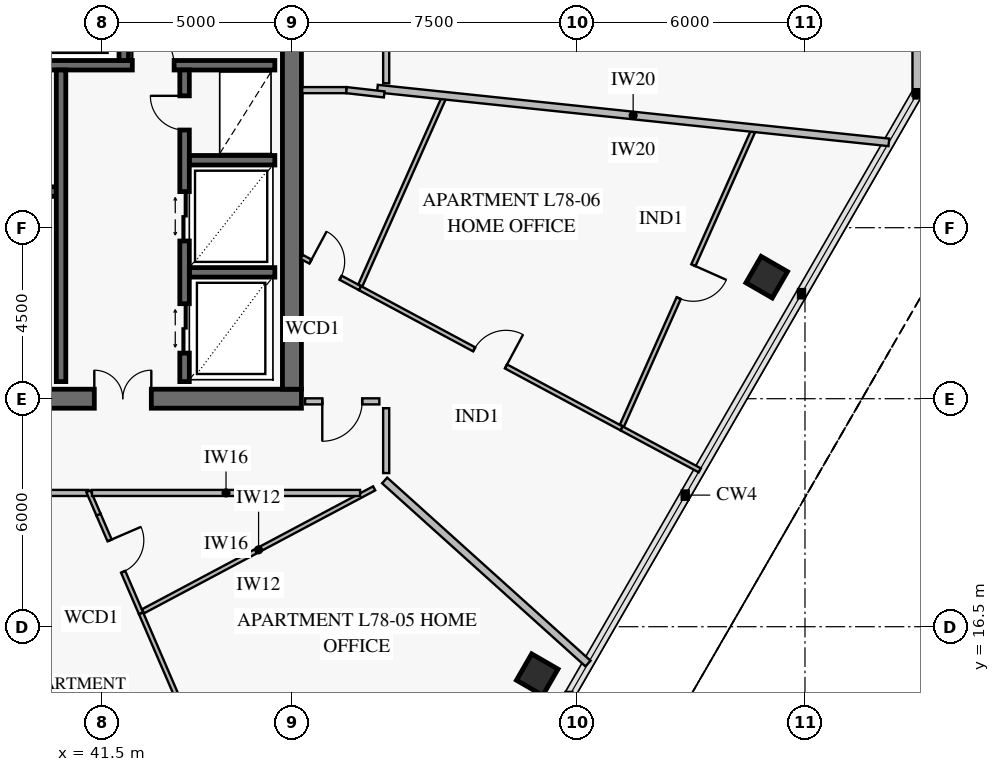
"""IFC4 building model, lengths in metres.
Left out: names, types, materials, properties, quantities, classifications, styles, units other than length and angle.
Written with IfcOpenShell. Run it as: python <this file> out.ifc"""

import sys

from ifc_helpers import new_model, si_unit, direction, frame, frame_2d, origin, origin_2d, place, context, subcontext, project, spatial, rectangle, extrude, element, fill, save


model = new_model("IFC4")
c1 = context("Model", 3, precision=1e-05, world=origin(), true_north=direction((0.0, 1.0)))
c2 = subcontext(c1, "Body", "Model", "MODEL_VIEW")
j1 = project(units=[si_unit("LENGTHUNIT", "METRE"), si_unit("PLANEANGLEUNIT", "RADIAN")], contexts=[c1])
p1 = place(None, origin())
s1 = spatial("IfcSite", under=j1, at=p1, CompositionType="ELEMENT")
p2 = place(p1, origin())
s2 = spatial("IfcBuilding", under=s1, at=p2, CompositionType="ELEMENT")
p3 = place(p2, frame((0.0, 0.0, 308.2)))
s3 = spatial("IfcBuildingStorey", under=s2, at=p3, CompositionType="ELEMENT", Elevation=308.2)
p4 = place(p3, frame((37.35, 22.5, 0.0), z_axis=(0.0, 0.0, 1.0), x_axis=(1.0, 0.0, 0.0)))
e1 = element("IfcWall", 1, at=p4, inside=s3, PredefinedType="SHEAR", context=c2, shape_type="SweptSolid", body=[
    extrude(rectangle(XDim=9.4, YDim=0.5, at=frame_2d((4.7, 0.0))), origin(), (0.0, 0.0, 1.0), 3.8),
])
p5 = place(p4, frame((3.95, 0.0, 0.0)))
e2 = element("IfcOpeningElement", 2, at=p5, cuts=e1, PredefinedType="OPENING", context=c2, shape_type="SweptSolid", body=[
    extrude(rectangle(XDim=1.5, YDim=2.15, at=frame_2d((0.75, 1.075))), frame((0.0, 0.262, 0.0), z_axis=(0.0, -1.0, 0.0), x_axis=(1.0, 0.0, 0.0)), (0.0, 0.0, 1.0), 0.524),
])
p6 = place(p3, frame((46.5, 22.75, 0.0), z_axis=(0.0, 0.0, 1.0), x_axis=(0.0, 1.0, 0.0)))
e3 = element("IfcWall", 3, at=p6, inside=s3, PredefinedType="SHEAR", context=c2, shape_type="SweptSolid", body=[
    extrude(rectangle(XDim=18.5, YDim=0.5, at=frame_2d((9.25, 0.0))), origin(), (0.0, 0.0, 1.0), 3.8),
])
p7 = place(p6, frame((9.0, 0.0, 0.0)))
e4 = element("IfcOpeningElement", 4, at=p7, cuts=e3, PredefinedType="OPENING", context=c2, shape_type="SweptSolid", body=[
    extrude(rectangle(XDim=1.1, YDim=2.15, at=frame_2d((0.55, 1.075))), frame((0.0, 0.262, 0.0), z_axis=(0.0, -1.0, 0.0), x_axis=(1.0, 0.0, 0.0)), (0.0, 0.0, 1.0), 0.524),
])
for number, where, z_axis, x_axis in (
    (5, (52.955, 15.238, 0.0), (0.0, 0.0, 1.0), (0.5, 0.866, 0.0)),
    (6, (58.993, 25.698, 0.0), (0.0, 0.0, 1.0), (0.5, 0.866, 0.0)),
):
    element("IfcColumn", number, at=place(p3, frame(where, z_axis=z_axis, x_axis=x_axis)), inside=s3, PredefinedType="COLUMN", context=c2, shape_type="SweptSolid", body=[
        extrude(rectangle(XDim=0.8, YDim=0.8, at=origin_2d()), origin(), (0.0, 0.0, 1.0), 3.55),
    ])
p8 = place(p3, frame((62.969, 33.532, 0.0), z_axis=(0.0, 0.0, 1.0), x_axis=(0.0, -1.0, 0.0)))
e7 = element("IfcWall", 7, at=p8, inside=s3, PredefinedType="SOLIDWALL", context=c2, shape_type="SweptSolid", body=[
    extrude(rectangle(XDim=3.065, YDim=0.28, at=frame_2d((1.532, 0.0))), origin(), (0.0, 0.0, 1.0), 3.55),
])
p9 = place(p3, frame((25.95, 31.275, 0.0), z_axis=(0.0, 0.0, 1.0), x_axis=(1.0, 0.0, 0.0)))
e8 = element("IfcWall", 8, at=p9, inside=s3, PredefinedType="SOLIDWALL", context=c2, shape_type="SweptSolid", body=[
    extrude(rectangle(XDim=20.1, YDim=0.25, at=frame_2d((10.05, 0.0))), origin(), (0.0, 0.0, 1.0), 3.8),
])
p10 = place(p9, frame((2.6, 0.0, 0.0)))
e9 = element("IfcOpeningElement", 9, at=p10, cuts=e8, PredefinedType="OPENING", context=c2, shape_type="SweptSolid", body=[
    extrude(rectangle(XDim=1.1, YDim=2.15, at=frame_2d((0.55, 1.075))), frame((0.0, 0.137, 0.0), z_axis=(0.0, -1.0, 0.0), x_axis=(1.0, 0.0, 0.0)), (0.0, 0.0, 1.0), 0.274),
])
p11 = place(p9, frame((10.6, 0.0, 0.0)))
e10 = element("IfcOpeningElement", 10, at=p11, cuts=e8, PredefinedType="OPENING", context=c2, shape_type="SweptSolid", body=[
    extrude(rectangle(XDim=1.1, YDim=2.15, at=frame_2d((0.55, 1.075))), frame((0.0, 0.137, 0.0), z_axis=(0.0, -1.0, 0.0), x_axis=(1.0, 0.0, 0.0)), (0.0, 0.0, 1.0), 0.274),
])
p12 = place(p9, frame((16.35, 0.0, 0.0)))
e11 = element("IfcOpeningElement", 11, at=p12, cuts=e8, PredefinedType="OPENING", context=c2, shape_type="SweptSolid", body=[
    extrude(rectangle(XDim=1.1, YDim=2.15, at=frame_2d((0.55, 1.075))), frame((0.0, 0.137, 0.0), z_axis=(0.0, -1.0, 0.0), x_axis=(1.0, 0.0, 0.0)), (0.0, 0.0, 1.0), 0.274),
])
p13 = place(p3, frame((42.075, 31.4, 0.0), z_axis=(0.0, 0.0, 1.0), x_axis=(0.0, 1.0, 0.0)))
e12 = element("IfcWall", 12, at=p13, inside=s3, PredefinedType="SOLIDWALL", context=c2, shape_type="SweptSolid", body=[
    extrude(rectangle(XDim=9.7, YDim=0.25, at=frame_2d((4.85, 0.0))), origin(), (0.0, 0.0, 1.0), 3.8),
])
p14 = place(p3, frame((38.0, 27.95, 0.0), z_axis=(0.0, 0.0, 1.0), x_axis=(1.0, 0.0, 0.0)))
e13 = element("IfcWall", 13, at=p14, inside=s3, PredefinedType="SOLIDWALL", context=c2, shape_type="SweptSolid", body=[
    extrude(rectangle(XDim=2.3, YDim=0.25, at=frame_2d((1.15, 0.0))), origin(), (0.0, 0.0, 1.0), 3.8),
])
p15 = place(p3, frame((40.425, 22.95, 0.0), z_axis=(0.0, 0.0, 1.0), x_axis=(0.0, 1.0, 0.0)))
e14 = element("IfcWall", 14, at=p15, inside=s3, PredefinedType="SOLIDWALL", context=c2, shape_type="SweptSolid", body=[
    extrude(rectangle(XDim=8.2, YDim=0.25, at=frame_2d((4.1, 0.0))), origin(), (0.0, 0.0, 1.0), 3.8),
])
for number, where, z_axis, x_axis in (
    (15, (43.8, 25.825, 0.0), (0.0, 0.0, 1.0), (1.0, 0.0, 0.0)),
    (16, (43.8, 28.775, 0.0), (0.0, 0.0, 1.0), (1.0, 0.0, 0.0)),
):
    element("IfcWall", number, at=place(p3, frame(where, z_axis=z_axis, x_axis=x_axis)), inside=s3, PredefinedType="SOLIDWALL", context=c2, shape_type="SweptSolid", body=[
        extrude(rectangle(XDim=2.25, YDim=0.25, at=frame_2d((1.125, 0.0))), origin(), (0.0, 0.0, 1.0), 3.8),
    ])
p16 = place(p3, frame((43.675, 22.95, 0.0), z_axis=(0.0, 0.0, 1.0), x_axis=(0.0, 1.0, 0.0)))
e17 = element("IfcWall", 17, at=p16, inside=s3, PredefinedType="SOLIDWALL", context=c2, shape_type="SweptSolid", body=[
    extrude(rectangle(XDim=8.2, YDim=0.25, at=frame_2d((4.1, 0.0))), origin(), (0.0, 0.0, 1.0), 3.8),
])
p17 = place(p16, frame((0.75, 0.0, 0.0)))
e18 = element("IfcOpeningElement", 18, at=p17, cuts=e17, PredefinedType="OPENING", context=c2, shape_type="SweptSolid", body=[
    extrude(rectangle(XDim=1.3, YDim=2.3, at=frame_2d((0.65, 1.15))), frame((0.0, 0.137, 0.0), z_axis=(0.0, -1.0, 0.0), x_axis=(1.0, 0.0, 0.0)), (0.0, 0.0, 1.0), 0.274),
])
p18 = place(p16, frame((3.7, 0.0, 0.0)))
e19 = element("IfcOpeningElement", 19, at=p18, cuts=e17, PredefinedType="OPENING", context=c2, shape_type="SweptSolid", body=[
    extrude(rectangle(XDim=1.3, YDim=2.3, at=frame_2d((0.65, 1.15))), frame((0.0, 0.137, 0.0), z_axis=(0.0, -1.0, 0.0), x_axis=(1.0, 0.0, 0.0)), (0.0, 0.0, 1.0), 0.274),
])
p19 = place(p16, frame((6.62, 0.0, 0.0)))
e20 = element("IfcOpeningElement", 20, at=p19, cuts=e17, PredefinedType="OPENING", context=c2, shape_type="SweptSolid", body=[
    extrude(rectangle(XDim=0.9, YDim=2.1, at=frame_2d((0.45, 1.05))), frame((0.0, 0.137, 0.0), z_axis=(0.0, -1.0, 0.0), x_axis=(1.0, 0.0, 0.0)), (0.0, 0.0, 1.0), 0.274),
])
p20 = place(p3, frame((41.41, 19.45, 0.0), z_axis=(0.0, 0.0, 1.0), x_axis=(0.395844398044, -0.918317598948, 0.0)))
e21 = element("IfcWall", 21, at=p20, inside=s3, PredefinedType="PARTITIONING", context=c2, shape_type="SweptSolid", body=[
    extrude(rectangle(XDim=2.83, YDim=0.12, at=frame_2d((1.415, 0.0))), origin(), (0.0, 0.0, 1.0), 3.55),
])
p21 = place(p20, frame((0.739, 0.0, 0.0)))
e22 = element("IfcOpeningElement", 22, at=p21, cuts=e21, PredefinedType="OPENING", context=c2, shape_type="SweptSolid", body=[
    extrude(rectangle(XDim=0.9, YDim=2.1, at=frame_2d((0.45, 1.05))), frame((0.0, 0.072, 0.0), z_axis=(0.0, -1.0, 0.0), x_axis=(1.0, 0.0, 0.0)), (0.0, 0.0, 1.0), 0.144),
])
p22 = place(p3, frame((42.531, 16.851, 0.0), z_axis=(0.0, 0.0, 1.0), x_axis=(0.39587300587, -0.918305266904, 0.0)))
e23 = element("IfcWall", 23, at=p22, inside=s3, PredefinedType="PARTITIONING", context=c2, shape_type="SweptSolid", body=[
    extrude(rectangle(XDim=7.643, YDim=0.12, at=frame_2d((3.821, 0.0))), origin(), (0.0, 0.0, 1.0), 2.97),
])
p23 = place(p22, frame((3.322, 0.0, 0.0)))
e24 = element("IfcOpeningElement", 24, at=p23, cuts=e23, PredefinedType="OPENING", context=c2, shape_type="SweptSolid", body=[
    extrude(rectangle(XDim=0.95, YDim=2.1, at=frame_2d((0.475, 1.05))), frame((0.0, 0.072, 0.0), z_axis=(0.0, -1.0, 0.0), x_axis=(1.0, 0.0, 0.0)), (0.0, 0.0, 1.0), 0.144),
])
p24 = place(p3, frame((37.811, 20.02, 0.0), z_axis=(0.0, 0.0, 1.0), x_axis=(1.0, 0.0, 0.0)))
e25 = element("IfcWall", 25, at=p24, inside=s3, PredefinedType="PARTITIONING", context=c2, shape_type="SweptSolid", body=[
    extrude(rectangle(XDim=3.332, YDim=0.16, at=frame_2d((1.666, 0.0))), origin(), (0.0, 0.0, 1.0), 3.0),
])
p25 = place(p24, frame((1.141, 0.0, 0.0)))
e26 = element("IfcOpeningElement", 26, at=p25, cuts=e25, PredefinedType="OPENING", context=c2, shape_type="SweptSolid", body=[
    extrude(rectangle(XDim=1.05, YDim=2.15, at=frame_2d((0.525, 1.075))), frame((0.0, 0.092, 0.0), z_axis=(0.0, -1.0, 0.0), x_axis=(1.0, 0.0, 0.0)), (0.0, 0.0, 1.0), 0.184),
])
p26 = place(p3, frame((46.758, 26.232, 0.0), z_axis=(0.0, 0.0, 1.0), x_axis=(0.881229995183, -0.472687735814, 0.0)))
e27 = element("IfcWall", 27, at=p26, inside=s3, PredefinedType="PARTITIONING", context=c2, shape_type="SweptSolid", body=[
    extrude(rectangle(XDim=1.743, YDim=0.12, at=frame_2d((0.872, 0.0))), origin(), (0.0, 0.0, 1.0), 3.55),
])
p27 = place(p26, frame((0.26, 0.0, 0.0)))
e28 = element("IfcOpeningElement", 28, at=p27, cuts=e27, PredefinedType="OPENING", context=c2, shape_type="SweptSolid", body=[
    extrude(rectangle(XDim=0.9, YDim=2.1, at=frame_2d((0.45, 1.05))), frame((0.0, 0.072, 0.0), z_axis=(0.0, -1.0, 0.0), x_axis=(1.0, 0.0, 0.0)), (0.0, 0.0, 1.0), 0.144),
])
p28 = place(p3, frame((48.294, 25.408, 0.0), z_axis=(0.0, 0.0, 1.0), x_axis=(0.881316812489, -0.472525846937, 0.0)))
e29 = element("IfcWall", 29, at=p28, inside=s3, PredefinedType="PARTITIONING", context=c2, shape_type="SweptSolid", body=[
    extrude(rectangle(XDim=7.811, YDim=0.12, at=frame_2d((3.905, 0.0))), origin(), (0.0, 0.0, 1.0), 3.2),
])
p29 = place(p28, frame((3.405, 0.0, 0.0)))
e30 = element("IfcOpeningElement", 30, at=p29, cuts=e29, PredefinedType="OPENING", context=c2, shape_type="SweptSolid", body=[
    extrude(rectangle(XDim=0.95, YDim=2.1, at=frame_2d((0.475, 1.05))), frame((0.0, 0.072, 0.0), z_axis=(0.0, -1.0, 0.0), x_axis=(1.0, 0.0, 0.0)), (0.0, 0.0, 1.0), 0.144),
])
p30 = place(p3, frame((55.183, 21.791, 0.0), z_axis=(0.0, 0.0, 1.0), x_axis=(0.406737913361, 0.913544892074, 0.0)))
e31 = element("IfcWall", 31, at=p30, inside=s3, PredefinedType="PARTITIONING", context=c2, shape_type="SweptSolid", body=[
    extrude(rectangle(XDim=8.463, YDim=0.12, at=frame_2d((4.232, 0.0))), origin(), (0.0, 0.0, 1.0), 3.0),
])
p31 = place(p30, frame((3.672, 0.0, 0.0)))
e32 = element("IfcOpeningElement", 32, at=p31, cuts=e31, PredefinedType="OPENING", context=c2, shape_type="SweptSolid", body=[
    extrude(rectangle(XDim=0.95, YDim=2.1, at=frame_2d((0.475, 1.05))), frame((0.0, 0.072, 0.0), z_axis=(0.0, -1.0, 0.0), x_axis=(1.0, 0.0, 0.0)), (0.0, 0.0, 1.0), 0.144),
])
p32 = place(p3, frame((48.8, 22.43, 0.0), z_axis=(0.0, 0.0, 1.0), x_axis=(-1.0, 0.0, 0.0)))
e33 = element("IfcWall", 33, at=p32, inside=s3, PredefinedType="PARTITIONING", context=c2, shape_type="SweptSolid", body=[
    extrude(rectangle(XDim=1.953, YDim=0.16, at=frame_2d((0.977, 0.0))), origin(), (0.0, 0.0, 1.0), 3.55),
])
p33 = place(p32, frame((0.451, 0.0, 0.0)))
e34 = element("IfcOpeningElement", 34, at=p33, cuts=e33, PredefinedType="OPENING", context=c2, shape_type="SweptSolid", body=[
    extrude(rectangle(XDim=1.05, YDim=2.15, at=frame_2d((0.525, 1.075))), frame((0.0, 0.092, 0.0), z_axis=(0.0, -1.0, 0.0), x_axis=(1.0, 0.0, 0.0)), (0.0, 0.0, 1.0), 0.184),
])
p34 = place(p3, frame((48.98, 30.8, 0.0), z_axis=(0.0, 0.0, 1.0), x_axis=(0.0, 1.0, 0.0)))
e35 = element("IfcWall", 35, at=p34, inside=s3, PredefinedType="PARTITIONING", context=c2, shape_type="SweptSolid", body=[
    extrude(rectangle(XDim=2.958, YDim=0.16, at=frame_2d((1.479, 0.0))), origin(), (0.0, 0.0, 1.0), 3.55),
])
p35 = place(p34, frame((0.954, 0.0, 0.0)))
e36 = element("IfcOpeningElement", 36, at=p35, cuts=e35, PredefinedType="OPENING", context=c2, shape_type="SweptSolid", body=[
    extrude(rectangle(XDim=1.05, YDim=2.15, at=frame_2d((0.525, 1.075))), frame((0.0, 0.092, 0.0), z_axis=(0.0, -1.0, 0.0), x_axis=(1.0, 0.0, 0.0)), (0.0, 0.0, 1.0), 0.184),
])
p36 = place(p3, frame((41.146, 20.063, 0.0), z_axis=(0.0, 0.0, 1.0), x_axis=(0.395728306554, -0.918367631938, 0.0)))
e37 = element("IfcWall", 37, at=p36, inside=s3, PredefinedType="PARTITIONING", context=c2, shape_type="SweptSolid", body=[
    extrude(rectangle(XDim=0.667, YDim=0.12, at=frame_2d((0.334, 0.0))), origin(), (0.0, 0.0, 1.0), 3.55),
])
p37 = place(p3, frame((42.581, 16.906, 0.0), z_axis=(0.0, 0.0, 1.0), x_axis=(0.882955532535, 0.469456630122, 0.0)))
e38 = element("IfcWall", 38, at=p37, inside=s3, PredefinedType="PARTITIONING", context=c2, shape_type="SweptSolid", body=[
    extrude(rectangle(XDim=6.889, YDim=0.12, at=frame_2d((3.445, 0.0))), origin(), (0.0, 0.0, 1.0), 3.0),
])
p38 = place(p3, frame((48.94, 20.349, 0.0), z_axis=(0.0, 0.0, 1.0), x_axis=(0.74315080538, -0.669123964944, 0.0)))
e39 = element("IfcWall", 39, at=p38, inside=s3, PredefinedType="PARTITIONING", context=c2, shape_type="SweptSolid", body=[
    extrude(rectangle(XDim=7.199, YDim=0.2, at=frame_2d((3.6, 0.0))), origin(), (0.0, 0.0, 1.0), 2.97),
])
p39 = place(p3, frame((55.178, 21.717, 0.0), z_axis=(0.0, 0.0, 1.0), x_axis=(0.881280537469, -0.472593497922, 0.0)))
e40 = element("IfcWall", 40, at=p39, inside=s3, PredefinedType="PARTITIONING", context=c2, shape_type="SweptSolid", body=[
    extrude(rectangle(XDim=2.33, YDim=0.12, at=frame_2d((1.165, 0.0))), origin(), (0.0, 0.0, 1.0), 2.97),
])
p40 = place(p3, frame((48.3, 25.482, 0.0), z_axis=(0.0, 0.0, 1.0), x_axis=(0.406734356289, 0.913546475782, 0.0)))
e41 = element("IfcWall", 41, at=p40, inside=s3, PredefinedType="PARTITIONING", context=c2, shape_type="SweptSolid", body=[
    extrude(rectangle(XDim=5.435, YDim=0.12, at=frame_2d((2.718, 0.0))), origin(), (0.0, 0.0, 1.0), 3.0),
])
p41 = place(p3, frame((48.749, 30.66, 0.0), z_axis=(0.0, 0.0, 1.0), x_axis=(0.994522047609, -0.104527014781, 0.0)))
e42 = element("IfcWall", 42, at=p41, inside=s3, PredefinedType="PARTITIONING", context=c2, shape_type="SweptSolid", body=[
    extrude(rectangle(XDim=13.533, YDim=0.2, at=frame_2d((6.767, 0.0))), origin(), (0.0, 0.0, 1.0), 2.97),
])
p42 = place(p3, frame((41.238, 20.02, 0.0), z_axis=(0.0, 0.0, 1.0), x_axis=(1.0, 0.0, 0.0)))
e43 = element("IfcWall", 43, at=p42, inside=s3, PredefinedType="PARTITIONING", context=c2, shape_type="SweptSolid", body=[
    extrude(rectangle(XDim=7.055, YDim=0.16, at=frame_2d((3.527, 0.0))), origin(), (0.0, 0.0, 1.0), 3.0),
])
p43 = place(p3, frame((48.98, 20.543, 0.0), z_axis=(0.0, 0.0, 1.0), x_axis=(0.0, 1.0, 0.0)))
e44 = element("IfcWall", 44, at=p43, inside=s3, PredefinedType="PARTITIONING", context=c2, shape_type="SweptSolid", body=[
    extrude(rectangle(XDim=1.707, YDim=0.16, at=frame_2d((0.854, 0.0))), origin(), (0.0, 0.0, 1.0), 3.55),
])
p44 = place(p3, frame((46.77, 30.62, 0.0), z_axis=(0.0, 0.0, 1.0), x_axis=(1.0, 0.0, 0.0)))
e45 = element("IfcWall", 45, at=p44, inside=s3, PredefinedType="PARTITIONING", context=c2, shape_type="SweptSolid", body=[
    extrude(rectangle(XDim=1.165, YDim=0.16, at=frame_2d((0.583, 0.0))), origin(), (0.0, 0.0, 1.0), 3.55),
])
p45 = place(p3, frame((47.935, 30.62, 0.0), z_axis=(0.0, 0.0, 1.0), x_axis=(0.99355156153, -0.113381191478, 0.0)))
e46 = element("IfcWall", 46, at=p45, inside=s3, PredefinedType="PARTITIONING", context=c2, shape_type="SweptSolid", body=[
    extrude(rectangle(XDim=0.999, YDim=0.16, at=frame_2d((0.5, 0.0))), origin(), (0.0, 0.0, 1.0), 3.55),
])
p46 = place(p5, origin())
e47 = element("IfcDoor", 47, at=p46, inside=s3, OperationType="DOUBLE_DOOR_SINGLE_SWING", PredefinedType="DOOR", context=c2, shape_type="SweptSolid", body=[
    extrude(rectangle(XDim=1.5, YDim=2.15, at=frame_2d((0.75, 1.075))), frame((0.0, 0.025, 0.0), z_axis=(0.0, -1.0, 0.0), x_axis=(1.0, 0.0, 0.0)), (0.0, 0.0, 1.0), 0.05),
])
fill(e2, e47)
p47 = place(p12, origin())
e48 = element("IfcDoor", 48, at=p47, inside=s3, OperationType="SINGLE_SWING_LEFT", PredefinedType="USERDEFINED", context=c2, shape_type="SweptSolid", body=[
    extrude(rectangle(XDim=1.1, YDim=2.15, at=frame_2d((0.55, 1.075))), frame((0.0, 0.025, 0.0), z_axis=(0.0, -1.0, 0.0), x_axis=(1.0, 0.0, 0.0)), (0.0, 0.0, 1.0), 0.05),
])
fill(e11, e48)
p48 = place(p17, origin())
e49 = element("IfcDoor", 49, at=p48, inside=s3, OperationType="DOUBLE_DOOR_SLIDING", PredefinedType="DOOR", context=c2, shape_type="SweptSolid", body=[
    extrude(rectangle(XDim=1.3, YDim=2.3, at=frame_2d((0.65, 1.15))), frame((0.0, 0.025, 0.0), z_axis=(0.0, -1.0, 0.0), x_axis=(1.0, 0.0, 0.0)), (0.0, 0.0, 1.0), 0.05),
])
fill(e18, e49)
p49 = place(p18, origin())
e50 = element("IfcDoor", 50, at=p49, inside=s3, OperationType="DOUBLE_DOOR_SLIDING", PredefinedType="DOOR", context=c2, shape_type="SweptSolid", body=[
    extrude(rectangle(XDim=1.3, YDim=2.3, at=frame_2d((0.65, 1.15))), frame((0.0, 0.025, 0.0), z_axis=(0.0, -1.0, 0.0), x_axis=(1.0, 0.0, 0.0)), (0.0, 0.0, 1.0), 0.05),
])
fill(e19, e50)
p50 = place(p19, origin())
e51 = element("IfcDoor", 51, at=p50, inside=s3, OperationType="SINGLE_SWING_RIGHT", PredefinedType="DOOR", context=c2, shape_type="SweptSolid", body=[
    extrude(rectangle(XDim=0.9, YDim=2.1, at=frame_2d((0.45, 1.05))), frame((0.0, 0.025, 0.0), z_axis=(0.0, -1.0, 0.0), x_axis=(1.0, 0.0, 0.0)), (0.0, 0.0, 1.0), 0.05),
])
fill(e20, e51)
p51 = place(p21, origin())
e52 = element("IfcDoor", 52, at=p51, inside=s3, OperationType="SINGLE_SWING_LEFT", PredefinedType="DOOR", context=c2, shape_type="SweptSolid", body=[
    extrude(rectangle(XDim=0.9, YDim=2.1, at=frame_2d((0.45, 1.05))), frame((0.0, 0.025, 0.0), z_axis=(0.0, -1.0, 0.0), x_axis=(1.0, 0.0, 0.0)), (0.0, 0.0, 1.0), 0.05),
])
fill(e22, e52)
p52 = place(p27, origin())
e53 = element("IfcDoor", 53, at=p52, inside=s3, OperationType="SINGLE_SWING_LEFT", PredefinedType="DOOR", context=c2, shape_type="SweptSolid", body=[
    extrude(rectangle(XDim=0.9, YDim=2.1, at=frame_2d((0.45, 1.05))), frame((0.0, 0.025, 0.0), z_axis=(0.0, -1.0, 0.0), x_axis=(1.0, 0.0, 0.0)), (0.0, 0.0, 1.0), 0.05),
])
fill(e28, e53)
p53 = place(p29, origin())
e54 = element("IfcDoor", 54, at=p53, inside=s3, OperationType="SINGLE_SWING_RIGHT", PredefinedType="DOOR", context=c2, shape_type="SweptSolid", body=[
    extrude(rectangle(XDim=0.95, YDim=2.1, at=frame_2d((0.475, 1.05))), frame((0.0, 0.025, 0.0), z_axis=(0.0, -1.0, 0.0), x_axis=(1.0, 0.0, 0.0)), (0.0, 0.0, 1.0), 0.05),
])
fill(e30, e54)
p54 = place(p31, frame((0.95, 0.0, 0.0), z_axis=(0.0, 0.0, 1.0), x_axis=(-1.0, 0.0, 0.0)))
e55 = element("IfcDoor", 55, at=p54, inside=s3, OperationType="SINGLE_SWING_LEFT", PredefinedType="DOOR", context=c2, shape_type="SweptSolid", body=[
    extrude(rectangle(XDim=0.95, YDim=2.1, at=frame_2d((0.475, 1.05))), frame((0.0, 0.025, 0.0), z_axis=(0.0, -1.0, 0.0), x_axis=(1.0, 0.0, 0.0)), (0.0, 0.0, 1.0), 0.05),
])
fill(e32, e55)
p55 = place(p33, origin())
e56 = element("IfcDoor", 56, at=p55, inside=s3, OperationType="SINGLE_SWING_RIGHT", PredefinedType="DOOR", context=c2, shape_type="SweptSolid", body=[
    extrude(rectangle(XDim=1.05, YDim=2.15, at=frame_2d((0.525, 1.075))), frame((0.0, 0.025, 0.0), z_axis=(0.0, -1.0, 0.0), x_axis=(1.0, 0.0, 0.0)), (0.0, 0.0, 1.0), 0.05),
])
fill(e34, e56)
save(model, sys.argv[1])
